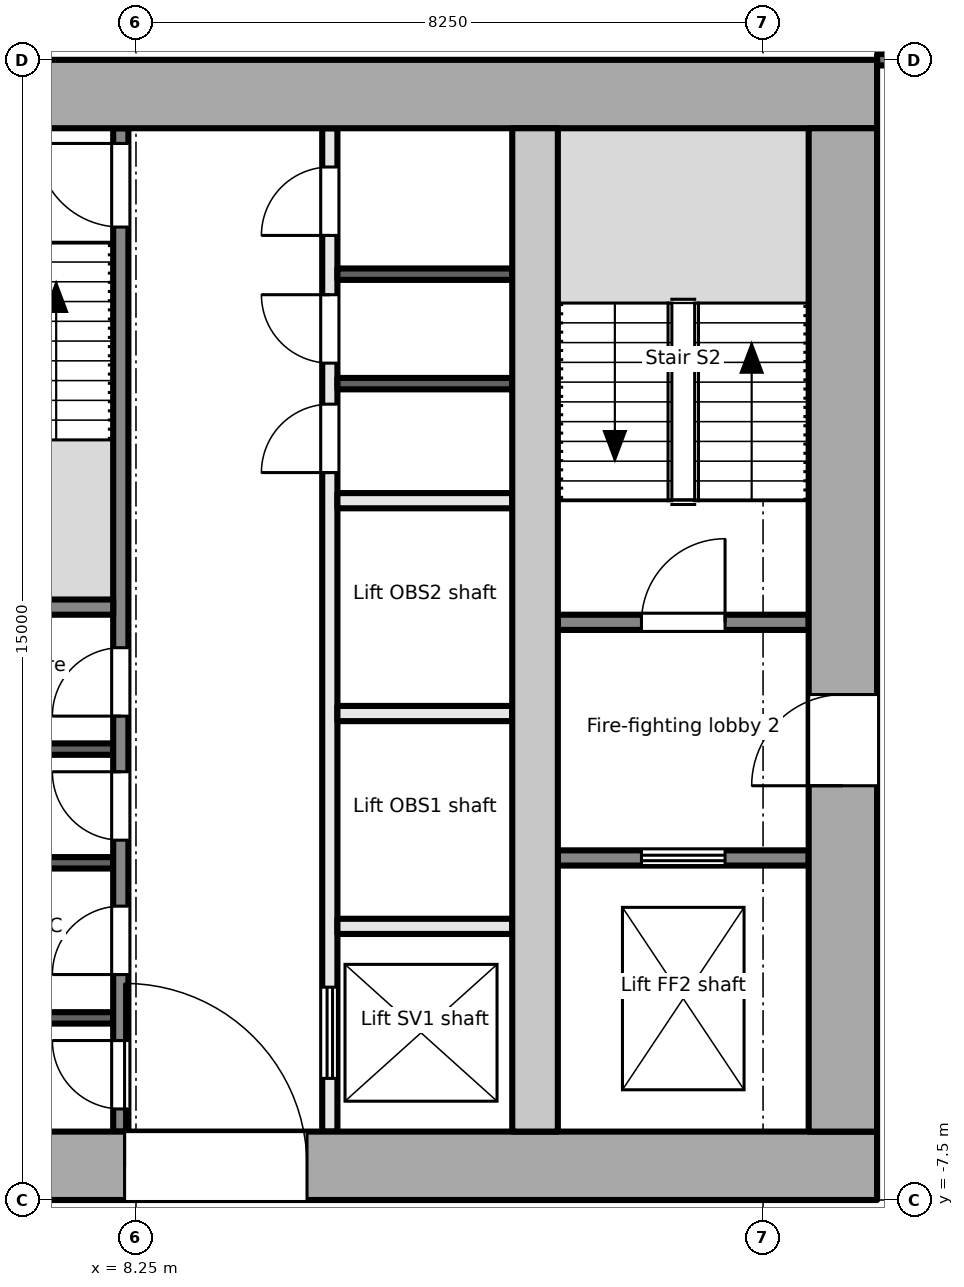
"""IFC4 building model, lengths in metres.
Left out: names, types, materials, properties, quantities, classifications, styles, units other than length and angle.
Written with IfcOpenShell. Run it as: python <this file> out.ifc"""

import sys

from ifc_helpers import new_model, si_unit, direction, frame, frame_2d, origin, place, context, subcontext, project, spatial, rectangle, extrude, element, fill, save


model = new_model("IFC4")
c1 = context("Model", 3, precision=1e-05, world=origin(), true_north=direction((0.0, 1.0)))
c2 = subcontext(c1, "Body", "Model", "MODEL_VIEW")
j1 = project(units=[si_unit("LENGTHUNIT", "METRE"), si_unit("PLANEANGLEUNIT", "RADIAN")], contexts=[c1])
p1 = place(None, origin())
s1 = spatial("IfcSite", under=j1, at=p1, CompositionType="ELEMENT")
p2 = place(p1, origin())
s2 = spatial("IfcBuilding", under=s1, at=p2, CompositionType="ELEMENT")
p3 = place(p2, frame((0.0, 0.0, 274.6)))
s3 = spatial("IfcBuildingStorey", under=s2, at=p3, CompositionType="ELEMENT", Elevation=274.6)
p4 = place(p3, frame((-18.0, -7.05, -0.2), z_axis=(0.0, 0.0, 1.0), x_axis=(1.0, 0.0, 0.0)))
e1 = element("IfcWall", 1, at=p4, inside=s3, PredefinedType="SHEAR", context=c2, shape_type="SweptSolid", body=[
    extrude(rectangle(XDim=36.0, YDim=0.9, at=frame_2d((18.0, 0.0))), origin(), (0.0, 0.0, 1.0), 3.9),
])
p5 = place(p4, frame((11.3, 0.0, 0.2)))
e2 = element("IfcOpeningElement", 2, at=p5, cuts=e1, PredefinedType="OPENING", context=c2, shape_type="SweptSolid", body=[
    extrude(rectangle(XDim=1.8, YDim=2.1, at=frame_2d((0.9, 1.05))), frame((0.0, 0.46, 0.0), z_axis=(0.0, -1.0, 0.0), x_axis=(1.0, 0.0, 0.0)), (0.0, 0.0, 1.0), 0.921),
])
p6 = place(p4, frame((16.8, 0.0, 0.2)))
e3 = element("IfcOpeningElement", 3, at=p6, cuts=e1, PredefinedType="OPENING", context=c2, shape_type="SweptSolid", body=[
    extrude(rectangle(XDim=2.4, YDim=2.1, at=frame_2d((1.2, 1.05))), frame((0.0, 0.46, 0.0), z_axis=(0.0, -1.0, 0.0), x_axis=(1.0, 0.0, 0.0)), (0.0, 0.0, 1.0), 0.921),
])
p7 = place(p4, frame((26.1, 0.0, 0.2)))
e4 = element("IfcOpeningElement", 4, at=p7, cuts=e1, PredefinedType="OPENING", context=c2, shape_type="SweptSolid", body=[
    extrude(rectangle(XDim=2.4, YDim=2.1, at=frame_2d((1.2, 1.05))), frame((0.0, 0.46, 0.0), z_axis=(0.0, -1.0, 0.0), x_axis=(1.0, 0.0, 0.0)), (0.0, 0.0, 1.0), 0.921),
])
p8 = place(p3, frame((-18.0, 7.05, -0.2), z_axis=(0.0, 0.0, 1.0), x_axis=(1.0, 0.0, 0.0)))
e5 = element("IfcWall", 5, at=p8, inside=s3, PredefinedType="SHEAR", context=c2, shape_type="SweptSolid", body=[
    extrude(rectangle(XDim=36.0, YDim=0.9, at=frame_2d((18.0, 0.0))), origin(), (0.0, 0.0, 1.0), 3.9),
])
p9 = place(p3, frame((17.55, -6.6, -0.2), z_axis=(0.0, 0.0, 1.0), x_axis=(0.0, 1.0, 0.0)))
e6 = element("IfcWall", 6, at=p9, inside=s3, PredefinedType="SHEAR", context=c2, shape_type="SweptSolid", body=[
    extrude(rectangle(XDim=13.2, YDim=0.9, at=frame_2d((6.6, 0.0))), origin(), (0.0, 0.0, 1.0), 3.9),
])
p10 = place(p9, frame((4.55, 0.0, 0.2)))
e7 = element("IfcOpeningElement", 7, at=p10, cuts=e6, PredefinedType="OPENING", context=c2, shape_type="SweptSolid", body=[
    extrude(rectangle(XDim=1.2, YDim=2.1, at=frame_2d((0.6, 1.05))), frame((0.0, 0.46, 0.0), z_axis=(0.0, -1.0, 0.0), x_axis=(1.0, 0.0, 0.0)), (0.0, 0.0, 1.0), 0.921),
])
p11 = place(p3, frame((13.5, -6.6, -0.2), z_axis=(0.0, 0.0, 1.0), x_axis=(0.0, 1.0, 0.0)))
e8 = element("IfcWall", 8, at=p11, inside=s3, PredefinedType="SHEAR", context=c2, shape_type="SweptSolid", body=[
    extrude(rectangle(XDim=13.2, YDim=0.6, at=frame_2d((6.6, 0.0))), origin(), (0.0, 0.0, 1.0), 3.9),
])
p12 = place(p3, frame((13.8, -3.0, 0.0), z_axis=(0.0, 0.0, 1.0), x_axis=(1.0, 0.0, 0.0)))
e9 = element("IfcWall", 9, at=p12, inside=s3, PredefinedType="PARTITIONING", context=c2, shape_type="SweptSolid", body=[
    extrude(rectangle(XDim=3.3, YDim=0.2, at=frame_2d((1.65, 0.0))), origin(), (0.0, 0.0, 1.0), 3.7),
])
p13 = place(p12, frame((1.1, 0.0, 0.0)))
e10 = element("IfcOpeningElement", 10, at=p13, cuts=e9, PredefinedType="OPENING", context=c2, shape_type="SweptSolid", body=[
    extrude(rectangle(XDim=1.1, YDim=2.1, at=frame_2d((0.55, 1.05))), frame((0.0, 0.111, 0.0), z_axis=(0.0, -1.0, 0.0), x_axis=(1.0, 0.0, 0.0)), (0.0, 0.0, 1.0), 0.221),
])
p14 = place(p3, frame((13.8, 0.1, 0.0), z_axis=(0.0, 0.0, 1.0), x_axis=(1.0, 0.0, 0.0)))
e11 = element("IfcWall", 11, at=p14, inside=s3, PredefinedType="PARTITIONING", context=c2, shape_type="SweptSolid", body=[
    extrude(rectangle(XDim=3.3, YDim=0.2, at=frame_2d((1.65, 0.0))), origin(), (0.0, 0.0, 1.0), 3.7),
])
p15 = place(p14, frame((1.1, 0.0, 0.0)))
e12 = element("IfcOpeningElement", 12, at=p15, cuts=e11, PredefinedType="OPENING", context=c2, shape_type="SweptSolid", body=[
    extrude(rectangle(XDim=1.1, YDim=2.1, at=frame_2d((0.55, 1.05))), frame((0.0, 0.111, 0.0), z_axis=(0.0, -1.0, 0.0), x_axis=(1.0, 0.0, 0.0)), (0.0, 0.0, 1.0), 0.221),
])
p16 = place(p3, frame((8.05, -6.6, 0.0), z_axis=(0.0, 0.0, 1.0), x_axis=(0.0, 1.0, 0.0)))
e13 = element("IfcWall", 13, at=p16, inside=s3, PredefinedType="PARTITIONING", context=c2, shape_type="SweptSolid", body=[
    extrude(rectangle(XDim=13.2, YDim=0.2, at=frame_2d((6.6, 0.0))), origin(), (0.0, 0.0, 1.0), 3.7),
])
p17 = place(p16, frame((0.298, 0.0, 0.0)))
e14 = element("IfcOpeningElement", 14, at=p17, cuts=e13, PredefinedType="OPENING", context=c2, shape_type="SweptSolid", body=[
    extrude(rectangle(XDim=0.9, YDim=2.1, at=frame_2d((0.45, 1.05))), frame((0.0, 0.111, 0.0), z_axis=(0.0, -1.0, 0.0), x_axis=(1.0, 0.0, 0.0)), (0.0, 0.0, 1.0), 0.221),
])
p18 = place(p16, frame((2.066, 0.0, 0.0)))
e15 = element("IfcOpeningElement", 15, at=p18, cuts=e13, PredefinedType="OPENING", context=c2, shape_type="SweptSolid", body=[
    extrude(rectangle(XDim=0.9, YDim=2.1, at=frame_2d((0.45, 1.05))), frame((0.0, 0.111, 0.0), z_axis=(0.0, -1.0, 0.0), x_axis=(1.0, 0.0, 0.0)), (0.0, 0.0, 1.0), 0.221),
])
p19 = place(p16, frame((3.834, 0.0, 0.0)))
e16 = element("IfcOpeningElement", 16, at=p19, cuts=e13, PredefinedType="OPENING", context=c2, shape_type="SweptSolid", body=[
    extrude(rectangle(XDim=0.9, YDim=2.1, at=frame_2d((0.45, 1.05))), frame((0.0, 0.111, 0.0), z_axis=(0.0, -1.0, 0.0), x_axis=(1.0, 0.0, 0.0)), (0.0, 0.0, 1.0), 0.221),
])
p20 = place(p16, frame((5.466, 0.0, 0.0)))
e17 = element("IfcOpeningElement", 17, at=p20, cuts=e13, PredefinedType="OPENING", context=c2, shape_type="SweptSolid", body=[
    extrude(rectangle(XDim=0.9, YDim=2.1, at=frame_2d((0.45, 1.05))), frame((0.0, 0.111, 0.0), z_axis=(0.0, -1.0, 0.0), x_axis=(1.0, 0.0, 0.0)), (0.0, 0.0, 1.0), 0.221),
])
p21 = place(p16, frame((11.9, 0.0, 0.0)))
e18 = element("IfcOpeningElement", 18, at=p21, cuts=e13, PredefinedType="OPENING", context=c2, shape_type="SweptSolid", body=[
    extrude(rectangle(XDim=1.1, YDim=2.1, at=frame_2d((0.55, 1.05))), frame((0.0, 0.111, 0.0), z_axis=(0.0, -1.0, 0.0), x_axis=(1.0, 0.0, 0.0)), (0.0, 0.0, 1.0), 0.221),
])
p22 = place(p3, frame((10.8, -6.6, 0.0), z_axis=(0.0, 0.0, 1.0), x_axis=(0.0, 1.0, 0.0)))
e19 = element("IfcWall", 19, at=p22, inside=s3, PredefinedType="PARTITIONING", context=c2, shape_type="SweptSolid", body=[
    extrude(rectangle(XDim=13.2, YDim=0.2, at=frame_2d((6.6, 0.0))), origin(), (0.0, 0.0, 1.0), 3.7),
])
p23 = place(p22, frame((0.7, 0.0, 0.0)))
e20 = element("IfcOpeningElement", 20, at=p23, cuts=e19, PredefinedType="OPENING", context=c2, shape_type="SweptSolid", body=[
    extrude(rectangle(XDim=1.2, YDim=2.1, at=frame_2d((0.6, 1.05))), frame((0.0, 0.111, 0.0), z_axis=(0.0, -1.0, 0.0), x_axis=(1.0, 0.0, 0.0)), (0.0, 0.0, 1.0), 0.221),
])
p24 = place(p22, frame((8.67, 0.0, 0.0)))
e21 = element("IfcOpeningElement", 21, at=p24, cuts=e19, PredefinedType="OPENING", context=c2, shape_type="SweptSolid", body=[
    extrude(rectangle(XDim=0.9, YDim=2.1, at=frame_2d((0.45, 1.05))), frame((0.0, 0.111, 0.0), z_axis=(0.0, -1.0, 0.0), x_axis=(1.0, 0.0, 0.0)), (0.0, 0.0, 1.0), 0.221),
])
p25 = place(p22, frame((10.11, 0.0, 0.0)))
e22 = element("IfcOpeningElement", 22, at=p25, cuts=e19, PredefinedType="OPENING", context=c2, shape_type="SweptSolid", body=[
    extrude(rectangle(XDim=0.9, YDim=2.1, at=frame_2d((0.45, 1.05))), frame((0.0, 0.111, 0.0), z_axis=(0.0, -1.0, 0.0), x_axis=(1.0, 0.0, 0.0)), (0.0, 0.0, 1.0), 0.221),
])
p26 = place(p22, frame((11.79, 0.0, 0.0)))
e23 = element("IfcOpeningElement", 23, at=p26, cuts=e19, PredefinedType="OPENING", context=c2, shape_type="SweptSolid", body=[
    extrude(rectangle(XDim=0.9, YDim=2.1, at=frame_2d((0.45, 1.05))), frame((0.0, 0.111, 0.0), z_axis=(0.0, -1.0, 0.0), x_axis=(1.0, 0.0, 0.0)), (0.0, 0.0, 1.0), 0.221),
])
p27 = place(p3, frame((4.8, 0.3, 0.0), z_axis=(0.0, 0.0, 1.0), x_axis=(1.0, 0.0, 0.0)))
e24 = element("IfcWall", 24, at=p27, inside=s3, PredefinedType="PARTITIONING", context=c2, shape_type="SweptSolid", body=[
    extrude(rectangle(XDim=3.15, YDim=0.2, at=frame_2d((1.575, 0.0))), origin(), (0.0, 0.0, 1.0), 3.7),
])
for number, where, z_axis, x_axis in (
    (25, (4.8, -5.104, 0.0), (0.0, 0.0, 1.0), (1.0, 0.0, 0.0)),
    (26, (4.8, -3.064, 0.0), (0.0, 0.0, 1.0), (1.0, 0.0, 0.0)),
    (27, (4.8, -1.568, 0.0), (0.0, 0.0, 1.0), (1.0, 0.0, 0.0)),
):
    element("IfcWall", number, at=place(p3, frame(where, z_axis=z_axis, x_axis=x_axis)), inside=s3, PredefinedType="PARTITIONING", context=c2, shape_type="SweptSolid", body=[
        extrude(rectangle(XDim=3.15, YDim=0.15, at=frame_2d((1.575, 0.0))), origin(), (0.0, 0.0, 1.0), 3.7),
    ])
for number, where, z_axis, x_axis in (
    (28, (10.9, -3.9, 0.0), (0.0, 0.0, 1.0), (1.0, 0.0, 0.0)),
    (29, (10.9, -1.1, 0.0), (0.0, 0.0, 1.0), (1.0, 0.0, 0.0)),
    (30, (10.9, 1.7, 0.0), (0.0, 0.0, 1.0), (1.0, 0.0, 0.0)),
):
    element("IfcWall", number, at=place(p3, frame(where, z_axis=z_axis, x_axis=x_axis)), inside=s3, PredefinedType="PARTITIONING", context=c2, shape_type="SweptSolid", body=[
        extrude(rectangle(XDim=2.3, YDim=0.2, at=frame_2d((1.15, 0.0))), origin(), (0.0, 0.0, 1.0), 3.7),
    ])
for number, where, z_axis, x_axis in (
    (31, (10.9, 3.24, 0.0), (0.0, 0.0, 1.0), (1.0, 0.0, 0.0)),
    (32, (10.9, 4.68, 0.0), (0.0, 0.0, 1.0), (1.0, 0.0, 0.0)),
):
    element("IfcWall", number, at=place(p3, frame(where, z_axis=z_axis, x_axis=x_axis)), inside=s3, PredefinedType="PARTITIONING", context=c2, shape_type="SweptSolid", body=[
        extrude(rectangle(XDim=2.3, YDim=0.15, at=frame_2d((1.15, 0.0))), origin(), (0.0, 0.0, 1.0), 3.7),
    ])
p28 = place(p3, frame((18.0, 7.501, 0.0), z_axis=(0.0, 0.0, 1.0), x_axis=(1.0, 0.0, 0.0)))
e33 = element("IfcWall", 33, at=p28, inside=s3, PredefinedType="PARTITIONING", context=c2, shape_type="SweptSolid", body=[
    extrude(rectangle(XDim=2.625, YDim=0.15, at=frame_2d((1.312, 0.0))), origin(), (0.0, 0.0, 1.0), 3.7),
])
p29 = place(p13, origin())
e34 = element("IfcDoor", 34, at=p29, inside=s3, OperationType="DOUBLE_DOOR_SLIDING", PredefinedType="DOOR", context=c2, shape_type="SweptSolid", body=[
    extrude(rectangle(XDim=1.1, YDim=2.1, at=frame_2d((0.55, 1.05))), frame((0.0, 0.025, 0.0), z_axis=(0.0, -1.0, 0.0), x_axis=(1.0, 0.0, 0.0)), (0.0, 0.0, 1.0), 0.05),
])
fill(e10, e34)
p30 = place(p10, origin())
e35 = element("IfcDoor", 35, at=p30, inside=s3, OperationType="SINGLE_SWING_LEFT", PredefinedType="DOOR", context=c2, shape_type="SweptSolid", body=[
    extrude(rectangle(XDim=1.2, YDim=2.1, at=frame_2d((0.6, 1.05))), frame((0.0, 0.025, 0.0), z_axis=(0.0, -1.0, 0.0), x_axis=(1.0, 0.0, 0.0)), (0.0, 0.0, 1.0), 0.05),
])
fill(e7, e35)
p31 = place(p15, origin())
e36 = element("IfcDoor", 36, at=p31, inside=s3, OperationType="SINGLE_SWING_RIGHT", PredefinedType="DOOR", context=c2, shape_type="SweptSolid", body=[
    extrude(rectangle(XDim=1.1, YDim=2.1, at=frame_2d((0.55, 1.05))), frame((0.0, 0.025, 0.0), z_axis=(0.0, -1.0, 0.0), x_axis=(1.0, 0.0, 0.0)), (0.0, 0.0, 1.0), 0.05),
])
fill(e12, e36)
p32 = place(p17, origin())
e37 = element("IfcDoor", 37, at=p32, inside=s3, OperationType="SINGLE_SWING_RIGHT", PredefinedType="DOOR", context=c2, shape_type="SweptSolid", body=[
    extrude(rectangle(XDim=0.9, YDim=2.1, at=frame_2d((0.45, 1.05))), frame((0.0, 0.025, 0.0), z_axis=(0.0, -1.0, 0.0), x_axis=(1.0, 0.0, 0.0)), (0.0, 0.0, 1.0), 0.05),
])
fill(e14, e37)
p33 = place(p18, origin())
e38 = element("IfcDoor", 38, at=p33, inside=s3, OperationType="SINGLE_SWING_LEFT", PredefinedType="DOOR", context=c2, shape_type="SweptSolid", body=[
    extrude(rectangle(XDim=0.9, YDim=2.1, at=frame_2d((0.45, 1.05))), frame((0.0, 0.025, 0.0), z_axis=(0.0, -1.0, 0.0), x_axis=(1.0, 0.0, 0.0)), (0.0, 0.0, 1.0), 0.05),
])
fill(e15, e38)
p34 = place(p19, origin())
e39 = element("IfcDoor", 39, at=p34, inside=s3, OperationType="SINGLE_SWING_RIGHT", PredefinedType="DOOR", context=c2, shape_type="SweptSolid", body=[
    extrude(rectangle(XDim=0.9, YDim=2.1, at=frame_2d((0.45, 1.05))), frame((0.0, 0.025, 0.0), z_axis=(0.0, -1.0, 0.0), x_axis=(1.0, 0.0, 0.0)), (0.0, 0.0, 1.0), 0.05),
])
fill(e16, e39)
p35 = place(p20, origin())
e40 = element("IfcDoor", 40, at=p35, inside=s3, OperationType="SINGLE_SWING_LEFT", PredefinedType="DOOR", context=c2, shape_type="SweptSolid", body=[
    extrude(rectangle(XDim=0.9, YDim=2.1, at=frame_2d((0.45, 1.05))), frame((0.0, 0.025, 0.0), z_axis=(0.0, -1.0, 0.0), x_axis=(1.0, 0.0, 0.0)), (0.0, 0.0, 1.0), 0.05),
])
fill(e17, e40)
p36 = place(p21, origin())
e41 = element("IfcDoor", 41, at=p36, inside=s3, OperationType="SINGLE_SWING_RIGHT", PredefinedType="DOOR", context=c2, shape_type="SweptSolid", body=[
    extrude(rectangle(XDim=1.1, YDim=2.1, at=frame_2d((0.55, 1.05))), frame((0.0, 0.025, 0.0), z_axis=(0.0, -1.0, 0.0), x_axis=(1.0, 0.0, 0.0)), (0.0, 0.0, 1.0), 0.05),
])
fill(e18, e41)
p37 = place(p7, origin())
e42 = element("IfcDoor", 42, at=p37, inside=s3, OperationType="DOUBLE_DOOR_DOUBLE_SWING", PredefinedType="DOOR", context=c2, shape_type="SweptSolid", body=[
    extrude(rectangle(XDim=2.4, YDim=2.1, at=frame_2d((1.2, 1.05))), frame((0.0, 0.025, 0.0), z_axis=(0.0, -1.0, 0.0), x_axis=(1.0, 0.0, 0.0)), (0.0, 0.0, 1.0), 0.05),
])
fill(e4, e42)
p38 = place(p23, origin())
e43 = element("IfcDoor", 43, at=p38, inside=s3, OperationType="DOUBLE_DOOR_SLIDING", PredefinedType="DOOR", context=c2, shape_type="SweptSolid", body=[
    extrude(rectangle(XDim=1.2, YDim=2.1, at=frame_2d((0.6, 1.05))), frame((0.0, 0.025, 0.0), z_axis=(0.0, -1.0, 0.0), x_axis=(1.0, 0.0, 0.0)), (0.0, 0.0, 1.0), 0.05),
])
fill(e20, e43)
p39 = place(p24, origin())
e44 = element("IfcDoor", 44, at=p39, inside=s3, OperationType="SINGLE_SWING_LEFT", PredefinedType="DOOR", context=c2, shape_type="SweptSolid", body=[
    extrude(rectangle(XDim=0.9, YDim=2.1, at=frame_2d((0.45, 1.05))), frame((0.0, 0.025, 0.0), z_axis=(0.0, -1.0, 0.0), x_axis=(1.0, 0.0, 0.0)), (0.0, 0.0, 1.0), 0.05),
])
fill(e21, e44)
p40 = place(p25, origin())
e45 = element("IfcDoor", 45, at=p40, inside=s3, OperationType="SINGLE_SWING_RIGHT", PredefinedType="DOOR", context=c2, shape_type="SweptSolid", body=[
    extrude(rectangle(XDim=0.9, YDim=2.1, at=frame_2d((0.45, 1.05))), frame((0.0, 0.025, 0.0), z_axis=(0.0, -1.0, 0.0), x_axis=(1.0, 0.0, 0.0)), (0.0, 0.0, 1.0), 0.05),
])
fill(e22, e45)
p41 = place(p26, origin())
e46 = element("IfcDoor", 46, at=p41, inside=s3, OperationType="SINGLE_SWING_LEFT", PredefinedType="DOOR", context=c2, shape_type="SweptSolid", body=[
    extrude(rectangle(XDim=0.9, YDim=2.1, at=frame_2d((0.45, 1.05))), frame((0.0, 0.025, 0.0), z_axis=(0.0, -1.0, 0.0), x_axis=(1.0, 0.0, 0.0)), (0.0, 0.0, 1.0), 0.05),
])
fill(e23, e46)
save(model, sys.argv[1])
